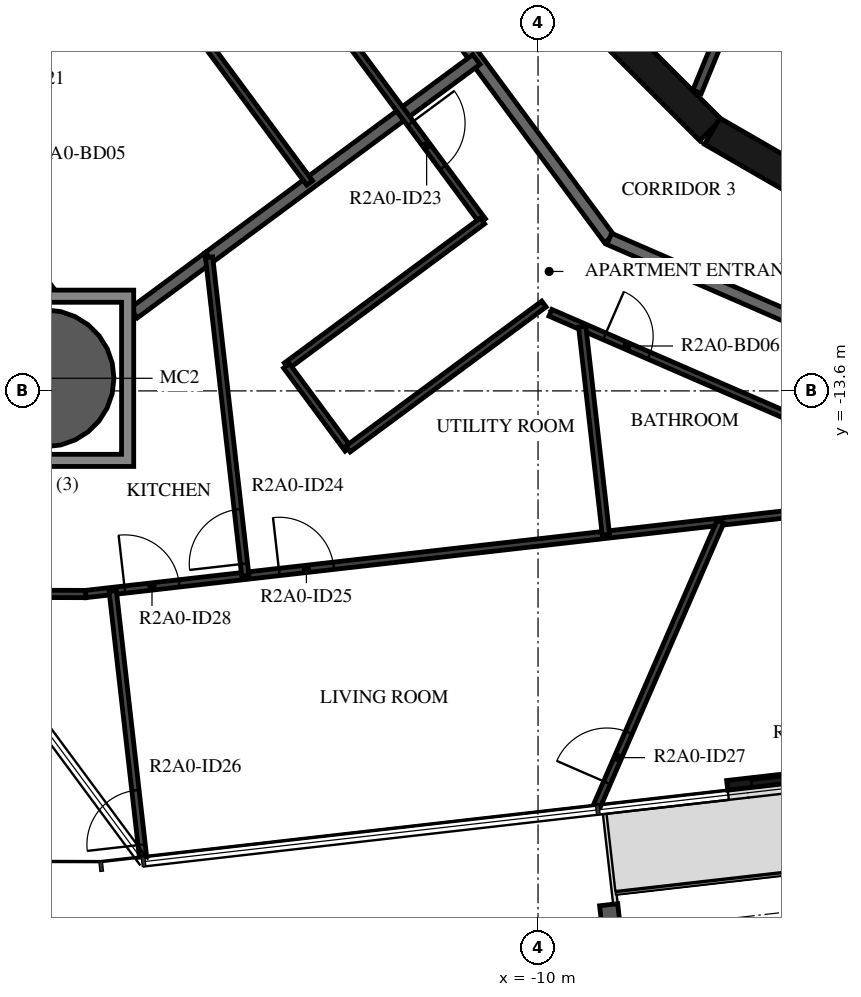
"""IFC4 building model, lengths in metres.
Left out: names, types, materials, properties, quantities, classifications, styles, units other than length and angle.
Written with IfcOpenShell. Run it as: python <this file> out.ifc"""

import sys

from ifc_helpers import new_model, si_unit, direction, frame, frame_2d, origin, origin_2d, place, context, subcontext, project, spatial, polyline, rectangle, hollow_circle, i_section, outline, extrude, element, fill, save


model = new_model("IFC4")
c1 = context("Model", 3, precision=1e-05, world=origin(), true_north=direction((0.0, 1.0)))
c2 = subcontext(c1, "Body", "Model", "MODEL_VIEW")
j1 = project(units=[si_unit("LENGTHUNIT", "METRE"), si_unit("PLANEANGLEUNIT", "RADIAN")], contexts=[c1])
p1 = place(None, origin())
s1 = spatial("IfcSite", under=j1, at=p1, CompositionType="ELEMENT")
p2 = place(p1, origin())
s2 = spatial("IfcBuilding", under=s1, at=p2, CompositionType="ELEMENT")
p3 = place(p2, frame((0.0, 0.0, 83.7)))
s3 = spatial("IfcBuildingStorey", under=s2, at=p3, CompositionType="ELEMENT", Elevation=83.7)
p4 = place(p3, frame((-18.099, -13.393, -0.38), z_axis=(0.0, 0.0, 1.0), x_axis=(1.0, 0.0, 0.0)))
e1 = element("IfcColumn", 1, at=p4, inside=s3, PredefinedType="COLUMN", context=c2, shape_type="SweptSolid", body=[
    extrude(hollow_circle(Radius=1.125, WallThickness=0.055, at=origin_2d()), origin(), (0.0, 0.0, 1.0), 3.5),
])
p5 = place(p3, frame((-8.788, -22.497, -0.38), z_axis=(0.0, 0.0, 1.0), x_axis=(-0.993571881569, -0.113202986513, 0.0)))
e2 = element("IfcColumn", 2, at=p5, inside=s3, PredefinedType="COLUMN", context=c2, shape_type="SweptSolid", body=[
    extrude(i_section(OverallWidth=0.3, OverallDepth=0.9, WebThickness=0.019, FlangeThickness=0.035, FilletRadius=0.03, at=origin_2d()), origin(), (0.0, 0.0, 1.0), 3.5),
])
p6 = place(p3, frame((-6.889, -20.086, 0.0), z_axis=(0.0, 0.0, 1.0), x_axis=(0.993578576686, 0.113144208648, 0.0)))
e3 = element("IfcWall", 3, at=p6, inside=s3, PredefinedType="STANDARD", context=c2, shape_type="SweptSolid", body=[
    extrude(rectangle(XDim=3.2, YDim=0.16, at=frame_2d((1.6, 0.0))), origin(), (0.0, 0.0, 1.0), 3.12),
])
p7 = place(p6, frame((0.4, 0.0, 0.0)))
e4 = element("IfcOpeningElement", 4, at=p7, cuts=e3, PredefinedType="OPENING", context=c2, shape_type="SweptSolid", body=[
    extrude(rectangle(XDim=2.4, YDim=2.4, at=frame_2d((1.2, 1.2))), frame((0.0, 0.09, 0.0), z_axis=(0.0, -1.0, 0.0), x_axis=(1.0, 0.0, 0.0)), (0.0, 0.0, 1.0), 0.18),
])
p8 = place(p3, frame((-9.308, -7.164, 0.0), z_axis=(0.0, 0.0, 1.0), x_axis=(0.707106781187, -0.707106781187, 0.0)))
e5 = element("IfcWall", 5, at=p8, inside=s3, PredefinedType="SHEAR", context=c2, shape_type="SweptSolid", body=[
    extrude(rectangle(XDim=3.032, YDim=0.5, at=frame_2d((1.516, 0.0))), origin(), (0.0, 0.0, 1.0), 3.12),
])
p9 = place(p3, frame((-7.137, -9.329, 0.0), z_axis=(0.0, 0.0, 1.0), x_axis=(0.865975092491, -0.500087131594, 0.0)))
e6 = element("IfcWall", 6, at=p9, inside=s3, PredefinedType="SHEAR", context=c2, shape_type="SweptSolid", body=[
    extrude(rectangle(XDim=3.033, YDim=0.5, at=frame_2d((1.516, 0.0))), origin(), (0.0, 0.0, 1.0), 3.12),
])
p10 = place(p3, frame((-7.385, -8.681, 0.0), z_axis=(0.0, 0.0, 1.0), x_axis=(0.379804590409, 0.925066739811, 0.0)))
e7 = element("IfcWall", 7, at=p10, inside=s3, PredefinedType="PARTITIONING", context=c2, shape_type="SweptSolid", body=[
    extrude(rectangle(XDim=3.885, YDim=0.15, at=frame_2d((1.942, 0.0))), origin(), (0.0, 0.0, 1.0), 3.12),
])
p11 = place(p10, frame((1.493, 0.0, 0.0)))
e8 = element("IfcOpeningElement", 8, at=p11, cuts=e7, PredefinedType="OPENING", context=c2, shape_type="SweptSolid", body=[
    extrude(rectangle(XDim=0.9, YDim=2.1, at=frame_2d((0.45, 1.05))), frame((0.0, 0.085, 0.0), z_axis=(0.0, -1.0, 0.0), x_axis=(1.0, 0.0, 0.0)), (0.0, 0.0, 1.0), 0.17),
])
p12 = place(p3, frame((-13.196, -5.198, 0.0), z_axis=(0.0, 0.0, 1.0), x_axis=(0.594805187394, -0.803869883159, 0.0)))
e9 = element("IfcWall", 9, at=p12, inside=s3, PredefinedType="STANDARD", context=c2, shape_type="SweptSolid", body=[
    extrude(rectangle(XDim=7.342, YDim=0.2, at=frame_2d((3.671, 0.0))), origin(), (0.0, 0.0, 1.0), 3.12),
])
p13 = place(p3, frame((-8.829, -11.1, 0.0), z_axis=(0.0, 0.0, 1.0), x_axis=(0.917063622491, -0.398740908742, 0.0)))
e10 = element("IfcWall", 10, at=p13, inside=s3, PredefinedType="STANDARD", context=c2, shape_type="SweptSolid", body=[
    extrude(rectangle(XDim=7.24, YDim=0.2, at=frame_2d((3.62, 0.0))), origin(), (0.0, 0.0, 1.0), 3.12),
])
p14 = place(p13, frame((6.04, 0.0, 0.0)))
e11 = element("IfcOpeningElement", 11, at=p14, cuts=e10, PredefinedType="OPENING", context=c2, shape_type="SweptSolid", body=[
    extrude(rectangle(XDim=1.0, YDim=2.1, at=frame_2d((0.5, 1.05))), frame((0.0, 0.11, 0.0), z_axis=(0.0, -1.0, 0.0), x_axis=(1.0, 0.0, 0.0)), (0.0, 0.0, 1.0), 0.22),
])
p15 = place(p3, frame((-15.41, -11.403, 0.0), z_axis=(0.0, 0.0, 1.0), x_axis=(0.803887568227, 0.594781285558, 0.0)))
e12 = element("IfcWall", 12, at=p15, inside=s3, PredefinedType="STANDARD", context=c2, shape_type="SweptSolid", body=[
    extrude(rectangle(XDim=5.47, YDim=0.2, at=frame_2d((2.735, 0.0))), origin(), (0.0, 0.0, 1.0), 3.12),
])
p16 = place(p3, frame((-16.649, -12.32, 0.0), z_axis=(0.0, 0.0, 1.0), x_axis=(0.803804030903, 0.594894175383, 0.0)))
e13 = element("IfcWall", 13, at=p16, inside=s3, PredefinedType="STANDARD", context=c2, shape_type="SweptSolid", body=[
    extrude(rectangle(XDim=1.542, YDim=0.2, at=frame_2d((0.771, 0.0))), origin(), (0.0, 0.0, 1.0), 3.12),
])
p17 = place(p3, frame((-14.641, -5.767, 0.0), z_axis=(0.0, 0.0, 1.0), x_axis=(0.594825885962, -0.803854567313, 0.0)))
e14 = element("IfcWall", 14, at=p17, inside=s3, PredefinedType="PARTITIONING", context=c2, shape_type="SweptSolid", body=[
    extrude(rectangle(XDim=6.266, YDim=0.12, at=frame_2d((3.133, 0.0))), origin(), (0.0, 0.0, 1.0), 3.12),
])
p18 = place(p17, frame((4.273, 0.0, 0.0)))
e15 = element("IfcOpeningElement", 15, at=p18, cuts=e14, PredefinedType="OPENING", context=c2, shape_type="SweptSolid", body=[
    extrude(rectangle(XDim=0.9, YDim=2.1, at=frame_2d((0.45, 1.05))), frame((0.0, 0.07, 0.0), z_axis=(0.0, -1.0, 0.0), x_axis=(1.0, 0.0, 0.0)), (0.0, 0.0, 1.0), 0.14),
])
p19 = place(p3, frame((-21.298, -11.722, 0.0), z_axis=(0.0, 0.0, 1.0), x_axis=(0.398737387658, 0.917065153456, 0.0)))
e16 = element("IfcWall", 16, at=p19, inside=s3, PredefinedType="PARTITIONING", context=c2, shape_type="SweptSolid", body=[
    extrude(rectangle(XDim=11.875, YDim=0.12, at=frame_2d((5.938, 0.0))), origin(), (0.0, 0.0, 1.0), 3.12),
])
p20 = place(p19, frame((8.26, 0.0, 0.0)))
e17 = element("IfcOpeningElement", 17, at=p20, cuts=e16, PredefinedType="OPENING", context=c2, shape_type="SweptSolid", body=[
    extrude(rectangle(XDim=0.9, YDim=2.1, at=frame_2d((0.45, 1.05))), frame((0.0, 0.07, 0.0), z_axis=(0.0, -1.0, 0.0), x_axis=(1.0, 0.0, 0.0)), (0.0, 0.0, 1.0), 0.14),
])
p21 = place(p19, frame((3.094, 0.0, 0.0)))
e18 = element("IfcOpeningElement", 18, at=p21, cuts=e16, PredefinedType="OPENING", context=c2, shape_type="SweptSolid", body=[
    extrude(rectangle(XDim=0.9, YDim=2.1, at=frame_2d((0.45, 1.05))), frame((0.0, 0.07, 0.0), z_axis=(0.0, -1.0, 0.0), x_axis=(1.0, 0.0, 0.0)), (0.0, 0.0, 1.0), 0.14),
])
p22 = place(p3, frame((-18.084, -4.331, 0.0), z_axis=(0.0, 0.0, 1.0), x_axis=(0.594811782108, -0.803865003508, 0.0)))
e19 = element("IfcWall", 19, at=p22, inside=s3, PredefinedType="PARTITIONING", context=c2, shape_type="SweptSolid", body=[
    extrude(rectangle(XDim=7.276, YDim=0.12, at=frame_2d((3.638, 0.0))), origin(), (0.0, 0.0, 1.0), 3.12),
])
p23 = place(p3, frame((-20.144, -9.068, 0.0), z_axis=(0.0, 0.0, 1.0), x_axis=(0.59487477233, -0.803818390711, 0.0)))
e20 = element("IfcWall", 20, at=p23, inside=s3, PredefinedType="PARTITIONING", context=c2, shape_type="SweptSolid", body=[
    extrude(rectangle(XDim=3.575, YDim=0.12, at=frame_2d((1.788, 0.0))), origin(), (0.0, 0.0, 1.0), 3.12),
])
p24 = place(p23, frame((0.4, 0.0, 0.0)))
e21 = element("IfcOpeningElement", 21, at=p24, cuts=e20, PredefinedType="OPENING", context=c2, shape_type="SweptSolid", body=[
    extrude(rectangle(XDim=0.8, YDim=2.1, at=frame_2d((0.4, 1.05))), frame((0.0, 0.07, 0.0), z_axis=(0.0, -1.0, 0.0), x_axis=(1.0, 0.0, 0.0)), (0.0, 0.0, 1.0), 0.14),
])
p25 = place(p3, frame((-10.914, -10.804, 0.0), z_axis=(0.0, 0.0, 1.0), x_axis=(-0.803864616889, -0.594812304609, 0.0)))
e22 = element("IfcWall", 22, at=p25, inside=s3, PredefinedType="PARTITIONING", context=c2, shape_type="SweptSolid", body=[
    extrude(rectangle(XDim=4.008, YDim=0.12, at=frame_2d((2.004, 0.0))), origin(), (0.0, 0.0, 1.0), 3.12),
])
p26 = place(p3, frame((-14.136, -13.188, 0.0), z_axis=(0.0, 0.0, 1.0), x_axis=(0.594863421241, -0.803826791087, 0.0)))
e23 = element("IfcWall", 23, at=p26, inside=s3, PredefinedType="PARTITIONING", context=c2, shape_type="SweptSolid", body=[
    extrude(rectangle(XDim=1.7, YDim=0.12, at=frame_2d((0.85, 0.0))), origin(), (0.0, 0.0, 1.0), 3.12),
])
p27 = place(p3, frame((-13.125, -14.555, 0.0), z_axis=(0.0, 0.0, 1.0), x_axis=(0.80389374229, 0.594772940799, 0.0)))
e24 = element("IfcWall", 24, at=p27, inside=s3, PredefinedType="PARTITIONING", context=c2, shape_type="SweptSolid", body=[
    extrude(rectangle(XDim=4.008, YDim=0.12, at=frame_2d((2.004, 0.0))), origin(), (0.0, 0.0, 1.0), 3.12),
])
p28 = place(p3, frame((-9.796, -12.315, 0.0), z_axis=(0.0, 0.0, 1.0), x_axis=(0.917059572812, -0.398750222463, 0.0)))
e25 = element("IfcWall", 25, at=p28, inside=s3, PredefinedType="PARTITIONING", context=c2, shape_type="SweptSolid", body=[
    extrude(rectangle(XDim=8.146, YDim=0.12, at=frame_2d((4.073, 0.0))), origin(), (0.0, 0.0, 1.0), 3.12),
])
p29 = place(p28, frame((0.969, 0.0, 0.0)))
e26 = element("IfcOpeningElement", 26, at=p29, cuts=e25, PredefinedType="OPENING", context=c2, shape_type="SweptSolid", body=[
    extrude(rectangle(XDim=0.8, YDim=2.1, at=frame_2d((0.4, 1.05))), frame((0.0, 0.07, 0.0), z_axis=(0.0, -1.0, 0.0), x_axis=(1.0, 0.0, 0.0)), (0.0, 0.0, 1.0), 0.14),
])
p30 = place(p3, frame((-18.524, -16.937, 0.0), z_axis=(0.0, 0.0, 1.0), x_axis=(0.999995736722, -0.00292002349, 0.0)))
e27 = element("IfcWall", 27, at=p30, inside=s3, PredefinedType="PARTITIONING", context=c2, shape_type="SweptSolid", body=[
    extrude(rectangle(XDim=1.087, YDim=0.12, at=frame_2d((0.543, 0.0))), origin(), (0.0, 0.0, 1.0), 3.12),
])
p31 = place(p3, frame((-17.437, -16.94, 0.0), z_axis=(0.0, 0.0, 1.0), x_axis=(0.993573314119, 0.113190412448, 0.0)))
e28 = element("IfcWall", 28, at=p31, inside=s3, PredefinedType="PARTITIONING", context=c2, shape_type="SweptSolid", body=[
    extrude(rectangle(XDim=14.576, YDim=0.12, at=frame_2d((7.288, 0.0))), origin(), (0.0, 0.0, 1.0), 3.12),
])
p32 = place(p31, frame((3.201, 0.0, 0.0)))
e29 = element("IfcOpeningElement", 29, at=p32, cuts=e28, PredefinedType="OPENING", context=c2, shape_type="SweptSolid", body=[
    extrude(rectangle(XDim=0.9, YDim=2.1, at=frame_2d((0.45, 1.05))), frame((0.0, 0.07, 0.0), z_axis=(0.0, -1.0, 0.0), x_axis=(1.0, 0.0, 0.0)), (0.0, 0.0, 1.0), 0.14),
])
p33 = place(p31, frame((0.645, 0.0, 0.0)))
e30 = element("IfcOpeningElement", 30, at=p33, cuts=e28, PredefinedType="OPENING", context=c2, shape_type="SweptSolid", body=[
    extrude(rectangle(XDim=0.9, YDim=2.1, at=frame_2d((0.45, 1.05))), frame((0.0, 0.07, 0.0), z_axis=(0.0, -1.0, 0.0), x_axis=(1.0, 0.0, 0.0)), (0.0, 0.0, 1.0), 0.14),
])
p34 = place(p3, frame((-14.813, -16.641, 0.0), z_axis=(0.0, 0.0, 1.0), x_axis=(-0.113210971478, 0.993570971767, 0.0)))
e31 = element("IfcWall", 31, at=p34, inside=s3, PredefinedType="PARTITIONING", context=c2, shape_type="SweptSolid", body=[
    extrude(rectangle(XDim=5.273, YDim=0.12, at=frame_2d((2.636, 0.0))), origin(), (0.0, 0.0, 1.0), 3.12),
])
p35 = place(p34, frame((0.2, 0.0, 0.0)))
e32 = element("IfcOpeningElement", 32, at=p35, cuts=e31, PredefinedType="OPENING", context=c2, shape_type="SweptSolid", body=[
    extrude(rectangle(XDim=0.9, YDim=2.1, at=frame_2d((0.45, 1.05))), frame((0.0, 0.07, 0.0), z_axis=(0.0, -1.0, 0.0), x_axis=(1.0, 0.0, 0.0)), (0.0, 0.0, 1.0), 0.14),
])
p36 = place(p3, frame((-16.496, -21.262, 0.0), z_axis=(0.0, 0.0, 1.0), x_axis=(-0.1132445713, 0.993567142709, 0.0)))
e33 = element("IfcWall", 33, at=p36, inside=s3, PredefinedType="PARTITIONING", context=c2, shape_type="SweptSolid", body=[
    extrude(rectangle(XDim=4.4, YDim=0.12, at=frame_2d((2.2, 0.0))), origin(), (0.0, 0.0, 1.0), 2.73),
])
p37 = place(p36, frame((0.2, 0.0, 0.0)))
e34 = element("IfcOpeningElement", 34, at=p37, cuts=e33, PredefinedType="OPENING", context=c2, shape_type="SweptSolid", body=[
    extrude(rectangle(XDim=0.9, YDim=2.1, at=frame_2d((0.45, 1.05))), frame((0.0, 0.07, 0.0), z_axis=(0.0, -1.0, 0.0), x_axis=(1.0, 0.0, 0.0)), (0.0, 0.0, 1.0), 0.14),
])
p38 = place(p3, frame((-8.884, -15.966, 0.0), z_axis=(0.0, 0.0, 1.0), x_axis=(-0.113230836929, 0.993568708026, 0.0)))
e35 = element("IfcWall", 35, at=p38, inside=s3, PredefinedType="PARTITIONING", context=c2, shape_type="SweptSolid", body=[
    extrude(rectangle(XDim=3.446, YDim=0.12, at=frame_2d((1.723, 0.0))), origin(), (0.0, 0.0, 1.0), 3.12),
])
p39 = place(p3, frame((-9.026, -20.41, 0.0), z_axis=(0.0, 0.0, 1.0), x_axis=(0.398750711167, 0.917059360316, 0.0)))
e36 = element("IfcWall", 36, at=p39, inside=s3, PredefinedType="PARTITIONING", context=c2, shape_type="SweptSolid", body=[
    extrude(rectangle(XDim=5.081, YDim=0.12, at=frame_2d((2.54, 0.0))), origin(), (0.0, 0.0, 1.0), 3.12),
])
p40 = place(p39, frame((0.4, 0.0, 0.0)))
e37 = element("IfcOpeningElement", 37, at=p40, cuts=e36, PredefinedType="OPENING", context=c2, shape_type="SweptSolid", body=[
    extrude(rectangle(XDim=0.9, YDim=2.1, at=frame_2d((0.45, 1.05))), frame((0.0, 0.07, 0.0), z_axis=(0.0, -1.0, 0.0), x_axis=(1.0, 0.0, 0.0)), (0.0, 0.0, 1.0), 0.14),
])
p41 = place(p3, origin())
e38 = element("IfcWall", 38, at=p41, inside=s3, PredefinedType="STANDARD", context=c2, shape_type="SweptSolid", body=[
    extrude(outline(polyline([(-16.649, -11.942), (-16.649, -14.843), (-19.549, -14.843), (-19.549, -11.942), (-16.649, -11.942)]), holes=[polyline([(-19.349, -14.643), (-16.849, -14.643), (-16.849, -12.143), (-19.349, -12.143), (-19.349, -14.643)])]), origin(), (0.0, 0.0, 1.0), 3.12),
])
p42 = place(p7, origin())
e39 = element("IfcDoor", 39, at=p42, inside=s3, OperationType="DOUBLE_DOOR_SLIDING", PredefinedType="DOOR", context=c2, shape_type="SweptSolid", body=[
    extrude(rectangle(XDim=2.4, YDim=2.4, at=frame_2d((1.2, 1.2))), frame((0.0, 0.025, 0.0), z_axis=(0.0, -1.0, 0.0), x_axis=(1.0, 0.0, 0.0)), (0.0, 0.0, 1.0), 0.05),
])
fill(e4, e39)
p43 = place(p18, origin())
e40 = element("IfcDoor", 40, at=p43, inside=s3, OperationType="SINGLE_SWING_LEFT", PredefinedType="DOOR", context=c2, shape_type="SweptSolid", body=[
    extrude(rectangle(XDim=0.9, YDim=2.1, at=frame_2d((0.45, 1.05))), frame((0.0, 0.025, 0.0), z_axis=(0.0, -1.0, 0.0), x_axis=(1.0, 0.0, 0.0)), (0.0, 0.0, 1.0), 0.05),
])
fill(e15, e40)
p44 = place(p29, origin())
e41 = element("IfcDoor", 41, at=p44, inside=s3, OperationType="SINGLE_SWING_LEFT", PredefinedType="DOOR", context=c2, shape_type="SweptSolid", body=[
    extrude(rectangle(XDim=0.8, YDim=2.1, at=frame_2d((0.4, 1.05))), frame((0.0, 0.025, 0.0), z_axis=(0.0, -1.0, 0.0), x_axis=(1.0, 0.0, 0.0)), (0.0, 0.0, 1.0), 0.05),
])
fill(e26, e41)
p45 = place(p35, origin())
e42 = element("IfcDoor", 42, at=p45, inside=s3, OperationType="SINGLE_SWING_LEFT", PredefinedType="DOOR", context=c2, shape_type="SweptSolid", body=[
    extrude(rectangle(XDim=0.9, YDim=2.1, at=frame_2d((0.45, 1.05))), frame((0.0, 0.025, 0.0), z_axis=(0.0, -1.0, 0.0), x_axis=(1.0, 0.0, 0.0)), (0.0, 0.0, 1.0), 0.05),
])
fill(e32, e42)
p46 = place(p32, origin())
e43 = element("IfcDoor", 43, at=p46, inside=s3, OperationType="SINGLE_SWING_LEFT", PredefinedType="DOOR", context=c2, shape_type="SweptSolid", body=[
    extrude(rectangle(XDim=0.9, YDim=2.1, at=frame_2d((0.45, 1.05))), frame((0.0, 0.025, 0.0), z_axis=(0.0, -1.0, 0.0), x_axis=(1.0, 0.0, 0.0)), (0.0, 0.0, 1.0), 0.05),
])
fill(e29, e43)
p47 = place(p37, origin())
e44 = element("IfcDoor", 44, at=p47, inside=s3, OperationType="SINGLE_SWING_LEFT", PredefinedType="DOOR", context=c2, shape_type="SweptSolid", body=[
    extrude(rectangle(XDim=0.9, YDim=2.1, at=frame_2d((0.45, 1.05))), frame((0.0, 0.025, 0.0), z_axis=(0.0, -1.0, 0.0), x_axis=(1.0, 0.0, 0.0)), (0.0, 0.0, 1.0), 0.05),
])
fill(e34, e44)
p48 = place(p40, origin())
e45 = element("IfcDoor", 45, at=p48, inside=s3, OperationType="SINGLE_SWING_RIGHT", PredefinedType="DOOR", context=c2, shape_type="SweptSolid", body=[
    extrude(rectangle(XDim=0.9, YDim=2.1, at=frame_2d((0.45, 1.05))), frame((0.0, 0.025, 0.0), z_axis=(0.0, -1.0, 0.0), x_axis=(1.0, 0.0, 0.0)), (0.0, 0.0, 1.0), 0.05),
])
fill(e37, e45)
p49 = place(p33, origin())
e46 = element("IfcDoor", 46, at=p49, inside=s3, OperationType="SINGLE_SWING_RIGHT", PredefinedType="DOOR", context=c2, shape_type="SweptSolid", body=[
    extrude(rectangle(XDim=0.9, YDim=2.1, at=frame_2d((0.45, 1.05))), frame((0.0, 0.025, 0.0), z_axis=(0.0, -1.0, 0.0), x_axis=(1.0, 0.0, 0.0)), (0.0, 0.0, 1.0), 0.05),
])
fill(e30, e46)
save(model, sys.argv[1])
